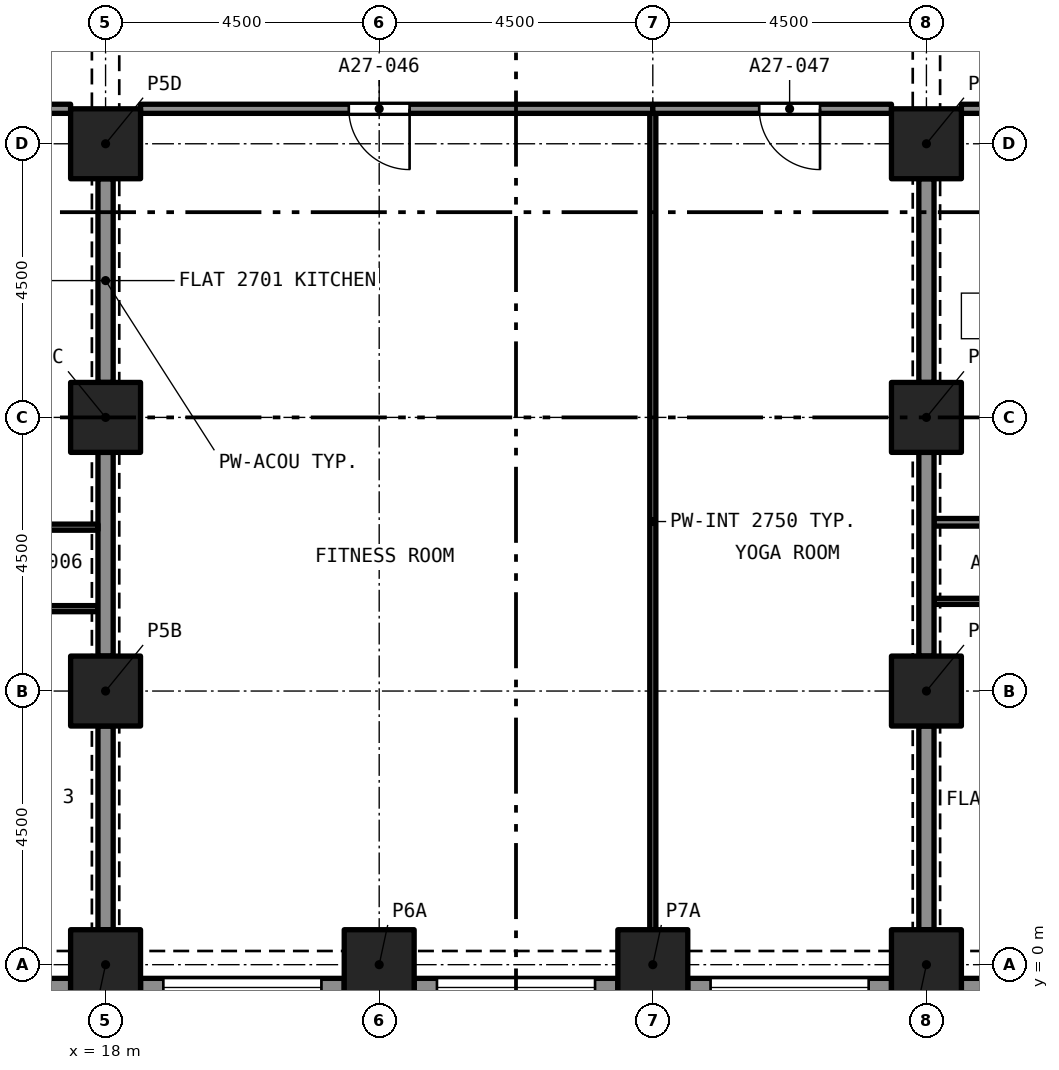
"""IFC4 building model, lengths in metres.
Left out: names, types, materials, properties, quantities, classifications, styles, units other than length and angle.
Written with IfcOpenShell. Run it as: python <this file> out.ifc"""

import sys

from ifc_helpers import new_model, si_unit, direction, frame, frame_2d, origin, origin_2d, place, context, subcontext, project, spatial, rectangle, extrude, element, fill, save


model = new_model("IFC4")
c1 = context("Model", 3, precision=1e-05, world=origin(), true_north=direction((0.0, 1.0)))
c2 = subcontext(c1, "Body", "Model", "MODEL_VIEW")
j1 = project(units=[si_unit("LENGTHUNIT", "METRE"), si_unit("PLANEANGLEUNIT", "RADIAN")], contexts=[c1])
p1 = place(None, origin())
s1 = spatial("IfcSite", under=j1, at=p1, CompositionType="ELEMENT")
p2 = place(p1, origin())
s2 = spatial("IfcBuilding", under=s1, at=p2, CompositionType="ELEMENT")
p3 = place(p2, frame((0.0, 0.0, 99.2)))
s3 = spatial("IfcBuildingStorey", under=s2, at=p3, CompositionType="ELEMENT", Elevation=99.2)
for number, where, z_axis, x_axis in (
    (1, (18.0, 0.0, 0.0), (0.0, 0.0, 1.0), (1.0, 0.0, 0.0)),
    (2, (22.5, 0.0, 0.0), (0.0, 0.0, 1.0), (1.0, 0.0, 0.0)),
    (3, (27.0, 0.0, 0.0), (0.0, 0.0, 1.0), (1.0, 0.0, 0.0)),
    (4, (31.5, 0.0, 0.0), (0.0, 0.0, 1.0), (1.0, 0.0, 0.0)),
    (5, (18.0, 4.5, 0.0), (0.0, 0.0, 1.0), (1.0, 0.0, 0.0)),
    (6, (31.5, 4.5, 0.0), (0.0, 0.0, 1.0), (1.0, 0.0, 0.0)),
    (7, (18.0, 9.0, 0.0), (0.0, 0.0, 1.0), (1.0, 0.0, 0.0)),
    (8, (31.5, 9.0, 0.0), (0.0, 0.0, 1.0), (1.0, 0.0, 0.0)),
    (9, (18.0, 13.5, 0.0), (0.0, 0.0, 1.0), (1.0, 0.0, 0.0)),
    (10, (31.5, 13.5, 0.0), (0.0, 0.0, 1.0), (1.0, 0.0, 0.0)),
):
    element("IfcColumn", number, at=place(p3, frame(where, z_axis=z_axis, x_axis=x_axis)), inside=s3, PredefinedType="COLUMN", context=c2, shape_type="SweptSolid", body=[
        extrude(rectangle(XDim=1.15, YDim=1.15, at=origin_2d()), origin(), (0.0, 0.0, 1.0), 3.2),
    ])
p4 = place(p3, frame((17.425, -0.375, 0.0), z_axis=(0.0, 0.0, 1.0), x_axis=(-1.0, 0.0, 0.0)))
e11 = element("IfcWall", 11, at=p4, inside=s3, PredefinedType="SOLIDWALL", context=c2, shape_type="SweptSolid", body=[
    extrude(rectangle(XDim=3.35, YDim=0.3, at=frame_2d((1.675, 0.0))), origin(), (0.0, 0.0, 1.0), 3.2),
])
p5 = place(p4, frame((0.375, 0.0, 0.45)))
e12 = element("IfcOpeningElement", 12, at=p5, cuts=e11, PredefinedType="OPENING", context=c2, shape_type="SweptSolid", body=[
    extrude(rectangle(XDim=2.6, YDim=1.95, at=frame_2d((1.3, 0.975))), frame((0.0, 0.16, 0.0), z_axis=(0.0, -1.0, 0.0), x_axis=(1.0, 0.0, 0.0)), (0.0, 0.0, 1.0), 0.32),
])
p6 = place(p3, frame((21.925, -0.375, 0.0), z_axis=(0.0, 0.0, 1.0), x_axis=(-1.0, 0.0, 0.0)))
e13 = element("IfcWall", 13, at=p6, inside=s3, PredefinedType="SOLIDWALL", context=c2, shape_type="SweptSolid", body=[
    extrude(rectangle(XDim=3.35, YDim=0.3, at=frame_2d((1.675, 0.0))), origin(), (0.0, 0.0, 1.0), 3.2),
])
p7 = place(p6, frame((0.375, 0.0, 0.45)))
e14 = element("IfcOpeningElement", 14, at=p7, cuts=e13, PredefinedType="OPENING", context=c2, shape_type="SweptSolid", body=[
    extrude(rectangle(XDim=2.6, YDim=1.95, at=frame_2d((1.3, 0.975))), frame((0.0, 0.16, 0.0), z_axis=(0.0, -1.0, 0.0), x_axis=(1.0, 0.0, 0.0)), (0.0, 0.0, 1.0), 0.32),
])
p8 = place(p3, frame((26.425, -0.375, 0.0), z_axis=(0.0, 0.0, 1.0), x_axis=(-1.0, 0.0, 0.0)))
e15 = element("IfcWall", 15, at=p8, inside=s3, PredefinedType="SOLIDWALL", context=c2, shape_type="SweptSolid", body=[
    extrude(rectangle(XDim=3.35, YDim=0.3, at=frame_2d((1.675, 0.0))), origin(), (0.0, 0.0, 1.0), 3.2),
])
p9 = place(p8, frame((0.375, 0.0, 0.45)))
e16 = element("IfcOpeningElement", 16, at=p9, cuts=e15, PredefinedType="OPENING", context=c2, shape_type="SweptSolid", body=[
    extrude(rectangle(XDim=2.6, YDim=1.95, at=frame_2d((1.3, 0.975))), frame((0.0, 0.16, 0.0), z_axis=(0.0, -1.0, 0.0), x_axis=(1.0, 0.0, 0.0)), (0.0, 0.0, 1.0), 0.32),
])
p10 = place(p3, frame((30.925, -0.375, 0.0), z_axis=(0.0, 0.0, 1.0), x_axis=(-1.0, 0.0, 0.0)))
e17 = element("IfcWall", 17, at=p10, inside=s3, PredefinedType="SOLIDWALL", context=c2, shape_type="SweptSolid", body=[
    extrude(rectangle(XDim=3.35, YDim=0.3, at=frame_2d((1.675, 0.0))), origin(), (0.0, 0.0, 1.0), 3.2),
])
p11 = place(p10, frame((0.375, 0.0, 0.45)))
e18 = element("IfcOpeningElement", 18, at=p11, cuts=e17, PredefinedType="OPENING", context=c2, shape_type="SweptSolid", body=[
    extrude(rectangle(XDim=2.6, YDim=1.95, at=frame_2d((1.3, 0.975))), frame((0.0, 0.16, 0.0), z_axis=(0.0, -1.0, 0.0), x_axis=(1.0, 0.0, 0.0)), (0.0, 0.0, 1.0), 0.32),
])
p12 = place(p3, frame((35.425, -0.375, 0.0), z_axis=(0.0, 0.0, 1.0), x_axis=(-1.0, 0.0, 0.0)))
e19 = element("IfcWall", 19, at=p12, inside=s3, PredefinedType="SOLIDWALL", context=c2, shape_type="SweptSolid", body=[
    extrude(rectangle(XDim=3.35, YDim=0.3, at=frame_2d((1.675, 0.0))), origin(), (0.0, 0.0, 1.0), 3.2),
])
p13 = place(p12, frame((0.375, 0.0, 0.45)))
e20 = element("IfcOpeningElement", 20, at=p13, cuts=e19, PredefinedType="OPENING", context=c2, shape_type="SweptSolid", body=[
    extrude(rectangle(XDim=2.6, YDim=1.95, at=frame_2d((1.3, 0.975))), frame((0.0, 0.16, 0.0), z_axis=(0.0, -1.0, 0.0), x_axis=(1.0, 0.0, 0.0)), (0.0, 0.0, 1.0), 0.32),
])
p14 = place(p3, frame((17.875, 5.855, 0.0), z_axis=(0.0, 0.0, 1.0), x_axis=(-1.0, 0.0, 0.0)))
e21 = element("IfcWall", 21, at=p14, inside=s3, PredefinedType="PARTITIONING", context=c2, shape_type="SweptSolid", body=[
    extrude(rectangle(XDim=4.375, YDim=0.1, at=frame_2d((2.188, 0.0))), origin(), (0.0, 0.0, 1.0), 2.9),
])
p15 = place(p14, frame((1.675, 0.0, 0.0)))
e22 = element("IfcOpeningElement", 22, at=p15, cuts=e21, PredefinedType="OPENING", context=c2, shape_type="SweptSolid", body=[
    extrude(rectangle(XDim=0.9, YDim=2.1, at=frame_2d((0.45, 1.05))), frame((0.0, 0.06, 0.0), z_axis=(0.0, -1.0, 0.0), x_axis=(1.0, 0.0, 0.0)), (0.0, 0.0, 1.0), 0.12),
])
for number, where, z_axis, x_axis in (
    (23, (18.0, 5.075, 0.0), (0.0, 0.0, 1.0), (0.0, 1.0, 0.0)),
    (24, (18.0, 0.575, 0.0), (0.0, 0.0, 1.0), (0.0, 1.0, 0.0)),
):
    element("IfcWall", number, at=place(p3, frame(where, z_axis=z_axis, x_axis=x_axis)), inside=s3, PredefinedType="PARTITIONING", context=c2, shape_type="SweptSolid", body=[
        extrude(rectangle(XDim=3.35, YDim=0.25, at=frame_2d((1.675, 0.0))), origin(), (0.0, 0.0, 1.0), 2.38),
    ])
p16 = place(p3, frame((15.175, 7.195, 0.0), z_axis=(0.0, 0.0, 1.0), x_axis=(1.0, 0.0, 0.0)))
e25 = element("IfcWall", 25, at=p16, inside=s3, PredefinedType="PARTITIONING", context=c2, shape_type="SweptSolid", body=[
    extrude(rectangle(XDim=2.7, YDim=0.1, at=frame_2d((1.35, 0.0))), origin(), (0.0, 0.0, 1.0), 2.9),
])
p17 = place(p16, frame((0.988, 0.0, 0.0)))
e26 = element("IfcOpeningElement", 26, at=p17, cuts=e25, PredefinedType="OPENING", context=c2, shape_type="SweptSolid", body=[
    extrude(rectangle(XDim=0.9, YDim=2.1, at=frame_2d((0.45, 1.05))), frame((0.0, 0.06, 0.0), z_axis=(0.0, -1.0, 0.0), x_axis=(1.0, 0.0, 0.0)), (0.0, 0.0, 1.0), 0.12),
])
p18 = place(p3, frame((18.0, 9.575, 0.0), z_axis=(0.0, 0.0, 1.0), x_axis=(0.0, 1.0, 0.0)))
e27 = element("IfcWall", 27, at=p18, inside=s3, PredefinedType="PARTITIONING", context=c2, shape_type="SweptSolid", body=[
    extrude(rectangle(XDim=3.35, YDim=0.25, at=frame_2d((1.675, 0.0))), origin(), (0.0, 0.0, 1.0), 2.38),
])
p19 = place(p3, frame((15.225, 14.075, 0.0), z_axis=(0.0, 0.0, 1.0), x_axis=(1.0, 0.0, 0.0)))
e28 = element("IfcWall", 28, at=p19, inside=s3, PredefinedType="PARTITIONING", context=c2, shape_type="SweptSolid", body=[
    extrude(rectangle(XDim=2.2, YDim=0.15, at=frame_2d((1.1, 0.0))), origin(), (0.0, 0.0, 1.0), 2.9),
])
p20 = place(p3, frame((31.625, 7.275, 0.0), z_axis=(0.0, 0.0, 1.0), x_axis=(1.0, 0.0, 0.0)))
e29 = element("IfcWall", 29, at=p20, inside=s3, PredefinedType="PARTITIONING", context=c2, shape_type="SweptSolid", body=[
    extrude(rectangle(XDim=2.662, YDim=0.125, at=frame_2d((1.331, 0.0))), origin(), (0.0, 0.0, 1.0), 2.9),
])
p21 = place(p20, frame((0.868, 0.0, 0.0)))
e30 = element("IfcOpeningElement", 30, at=p21, cuts=e29, PredefinedType="OPENING", context=c2, shape_type="SweptSolid", body=[
    extrude(rectangle(XDim=0.8, YDim=2.1, at=frame_2d((0.4, 1.05))), frame((0.0, 0.073, 0.0), z_axis=(0.0, -1.0, 0.0), x_axis=(1.0, 0.0, 0.0)), (0.0, 0.0, 1.0), 0.145),
])
p22 = place(p3, frame((31.5, 9.575, 0.0), z_axis=(0.0, 0.0, 1.0), x_axis=(0.0, 1.0, 0.0)))
e31 = element("IfcWall", 31, at=p22, inside=s3, PredefinedType="PARTITIONING", context=c2, shape_type="SweptSolid", body=[
    extrude(rectangle(XDim=3.35, YDim=0.25, at=frame_2d((1.675, 0.0))), origin(), (0.0, 0.0, 1.0), 2.38),
])
p23 = place(p3, frame((32.075, 14.075, 0.0), z_axis=(0.0, 0.0, 1.0), x_axis=(1.0, 0.0, 0.0)))
e32 = element("IfcWall", 32, at=p23, inside=s3, PredefinedType="PARTITIONING", context=c2, shape_type="SweptSolid", body=[
    extrude(rectangle(XDim=5.575, YDim=0.15, at=frame_2d((2.788, 0.0))), origin(), (0.0, 0.0, 1.0), 2.9),
])
p24 = place(p3, frame((36.0, 5.975, 0.0), z_axis=(0.0, 0.0, 1.0), x_axis=(-1.0, 0.0, 0.0)))
e33 = element("IfcWall", 33, at=p24, inside=s3, PredefinedType="PARTITIONING", context=c2, shape_type="SweptSolid", body=[
    extrude(rectangle(XDim=4.375, YDim=0.1, at=frame_2d((2.188, 0.0))), origin(), (0.0, 0.0, 1.0), 2.9),
])
p25 = place(p24, frame((1.75, 0.0, 0.0)))
e34 = element("IfcOpeningElement", 34, at=p25, cuts=e33, PredefinedType="OPENING", context=c2, shape_type="SweptSolid", body=[
    extrude(rectangle(XDim=1.0, YDim=2.1, at=frame_2d((0.5, 1.05))), frame((0.0, 0.06, 0.0), z_axis=(0.0, -1.0, 0.0), x_axis=(1.0, 0.0, 0.0)), (0.0, 0.0, 1.0), 0.12),
])
for number, where, z_axis, x_axis in (
    (35, (31.5, 0.575, 0.0), (0.0, 0.0, 1.0), (0.0, 1.0, 0.0)),
    (36, (31.5, 5.075, 0.0), (0.0, 0.0, 1.0), (0.0, 1.0, 0.0)),
):
    element("IfcWall", number, at=place(p3, frame(where, z_axis=z_axis, x_axis=x_axis)), inside=s3, PredefinedType="PARTITIONING", context=c2, shape_type="SweptSolid", body=[
        extrude(rectangle(XDim=3.35, YDim=0.25, at=frame_2d((1.675, 0.0))), origin(), (0.0, 0.0, 1.0), 2.38),
    ])
p26 = place(p3, frame((27.0, 0.575, 0.0), z_axis=(0.0, 0.0, 1.0), x_axis=(0.0, 1.0, 0.0)))
e37 = element("IfcWall", 37, at=p26, inside=s3, PredefinedType="PARTITIONING", context=c2, shape_type="SweptSolid", body=[
    extrude(rectangle(XDim=13.425, YDim=0.1, at=frame_2d((6.712, 0.0))), origin(), (0.0, 0.0, 1.0), 2.75),
])
p27 = place(p3, frame((27.0, 14.075, 0.0), z_axis=(0.0, 0.0, 1.0), x_axis=(-1.0, 0.0, 0.0)))
e38 = element("IfcWall", 38, at=p27, inside=s3, PredefinedType="PARTITIONING", context=c2, shape_type="SweptSolid", body=[
    extrude(rectangle(XDim=8.425, YDim=0.15, at=frame_2d((4.212, 0.0))), origin(), (0.0, 0.0, 1.0), 2.75),
])
p28 = place(p27, frame((4.0, 0.0, 0.0)))
e39 = element("IfcOpeningElement", 39, at=p28, cuts=e38, PredefinedType="OPENING", context=c2, shape_type="SweptSolid", body=[
    extrude(rectangle(XDim=1.0, YDim=2.1, at=frame_2d((0.5, 1.05))), frame((0.0, 0.085, 0.0), z_axis=(0.0, -1.0, 0.0), x_axis=(1.0, 0.0, 0.0)), (0.0, 0.0, 1.0), 0.17),
])
p29 = place(p3, frame((30.925, 14.075, 0.0), z_axis=(0.0, 0.0, 1.0), x_axis=(-1.0, 0.0, 0.0)))
e40 = element("IfcWall", 40, at=p29, inside=s3, PredefinedType="PARTITIONING", context=c2, shape_type="SweptSolid", body=[
    extrude(rectangle(XDim=3.925, YDim=0.15, at=frame_2d((1.962, 0.0))), origin(), (0.0, 0.0, 1.0), 2.75),
])
p30 = place(p29, frame((1.175, 0.0, 0.0)))
e41 = element("IfcOpeningElement", 41, at=p30, cuts=e40, PredefinedType="OPENING", context=c2, shape_type="SweptSolid", body=[
    extrude(rectangle(XDim=1.0, YDim=2.1, at=frame_2d((0.5, 1.05))), frame((0.0, 0.085, 0.0), z_axis=(0.0, -1.0, 0.0), x_axis=(1.0, 0.0, 0.0)), (0.0, 0.0, 1.0), 0.17),
])
p31 = place(p7, origin())
e42 = element("IfcWindow", 42, at=p31, inside=s3, PartitioningType="SINGLE_PANEL", PredefinedType="WINDOW", context=c2, shape_type="SweptSolid", body=[
    extrude(rectangle(XDim=2.6, YDim=1.95, at=frame_2d((1.3, 0.975))), frame((0.0, 0.03, 0.0), z_axis=(0.0, -1.0, 0.0), x_axis=(1.0, 0.0, 0.0)), (0.0, 0.0, 1.0), 0.06),
])
fill(e14, e42)
p32 = place(p9, origin())
e43 = element("IfcWindow", 43, at=p32, inside=s3, PartitioningType="SINGLE_PANEL", PredefinedType="WINDOW", context=c2, shape_type="SweptSolid", body=[
    extrude(rectangle(XDim=2.6, YDim=1.95, at=frame_2d((1.3, 0.975))), frame((0.0, 0.03, 0.0), z_axis=(0.0, -1.0, 0.0), x_axis=(1.0, 0.0, 0.0)), (0.0, 0.0, 1.0), 0.06),
])
fill(e16, e43)
p33 = place(p11, origin())
e44 = element("IfcWindow", 44, at=p33, inside=s3, PartitioningType="SINGLE_PANEL", PredefinedType="WINDOW", context=c2, shape_type="SweptSolid", body=[
    extrude(rectangle(XDim=2.6, YDim=1.95, at=frame_2d((1.3, 0.975))), frame((0.0, 0.03, 0.0), z_axis=(0.0, -1.0, 0.0), x_axis=(1.0, 0.0, 0.0)), (0.0, 0.0, 1.0), 0.06),
])
fill(e18, e44)
p34 = place(p28, origin())
e45 = element("IfcDoor", 45, at=p34, inside=s3, OperationType="SINGLE_SWING_RIGHT", PredefinedType="DOOR", context=c2, shape_type="SweptSolid", body=[
    extrude(rectangle(XDim=1.0, YDim=2.1, at=frame_2d((0.5, 1.05))), frame((0.0, 0.025, 0.0), z_axis=(0.0, -1.0, 0.0), x_axis=(1.0, 0.0, 0.0)), (0.0, 0.0, 1.0), 0.05),
])
fill(e39, e45)
p35 = place(p30, origin())
e46 = element("IfcDoor", 46, at=p35, inside=s3, OperationType="SINGLE_SWING_LEFT", PredefinedType="DOOR", context=c2, shape_type="SweptSolid", body=[
    extrude(rectangle(XDim=1.0, YDim=2.1, at=frame_2d((0.5, 1.05))), frame((0.0, 0.025, 0.0), z_axis=(0.0, -1.0, 0.0), x_axis=(1.0, 0.0, 0.0)), (0.0, 0.0, 1.0), 0.05),
])
fill(e41, e46)
save(model, sys.argv[1])
